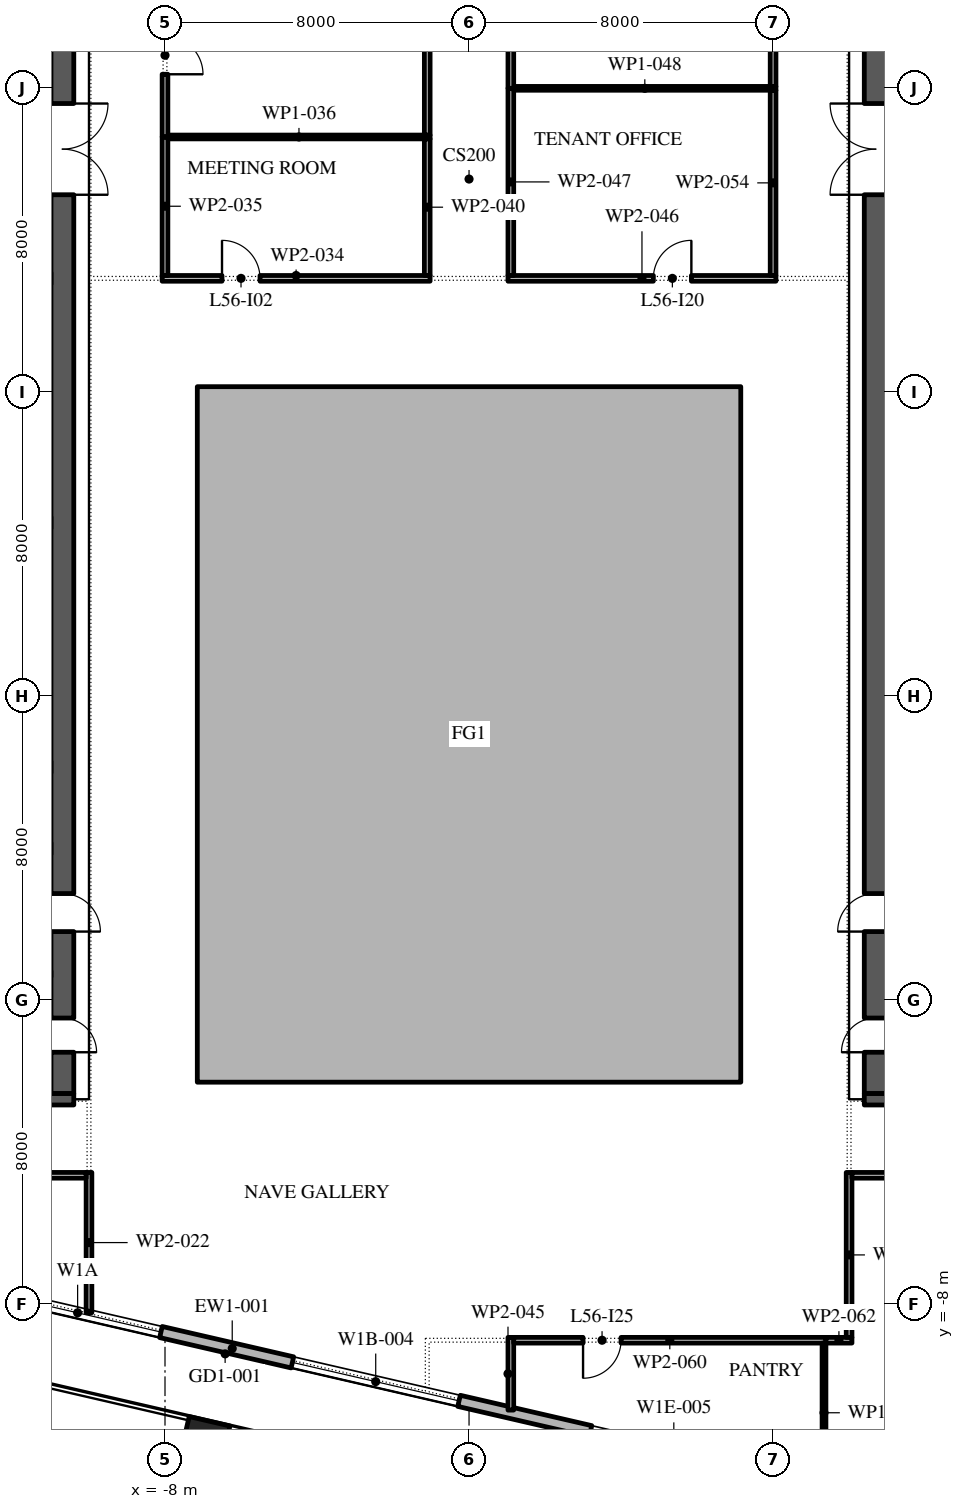
"""IFC4 building model, lengths in metres.
Left out: names, types, materials, properties, quantities, classifications, styles, units other than length and angle.
Written with IfcOpenShell. Run it as: python <this file> out.ifc"""

import sys

from ifc_helpers import new_model, si_unit, direction, frame, frame_2d, origin, origin_2d, place, context, subcontext, project, spatial, polyline, rectangle, outline, extrude, element, fill, save


model = new_model("IFC4")
c1 = context("Model", 3, precision=1e-05, world=origin(), true_north=direction((0.0, 1.0)))
c2 = subcontext(c1, "Body", "Model", "MODEL_VIEW")
j1 = project(units=[si_unit("LENGTHUNIT", "METRE"), si_unit("PLANEANGLEUNIT", "RADIAN")], contexts=[c1])
p1 = place(None, origin())
s1 = spatial("IfcSite", under=j1, at=p1, CompositionType="ELEMENT")
p2 = place(p1, origin())
s2 = spatial("IfcBuilding", under=s1, at=p2, CompositionType="ELEMENT")
p3 = place(p2, frame((0.0, 0.0, 259.8)))
s3 = spatial("IfcBuildingStorey", under=s2, at=p3, CompositionType="ELEMENT", Elevation=259.8)
p4 = place(p3, frame((-6.951, -11.608, 0.0), z_axis=(0.0, 0.0, 1.0), x_axis=(0.974370064785, -0.224951054344, 0.0)))
e1 = element("IfcColumn", 1, at=p4, inside=s3, PredefinedType="COLUMN", context=c2, shape_type="SweptSolid", body=[
    extrude(rectangle(XDim=1.1, YDim=1.1, at=origin_2d()), origin(), (0.0, 0.0, 1.0), 4.2),
])
p5 = place(p3, origin())
e2 = element("IfcWall", 2, at=p5, inside=s3, PredefinedType="STANDARD", context=c2, shape_type="SweptSolid", body=[
    extrude(outline(polyline([(-7.15, -2.15), (7.15, -2.15), (7.15, 16.15), (-7.15, 16.15), (-7.15, -2.15)]), holes=[polyline([(-7.0, -2.0), (-7.0, 16.0), (7.0, 16.0), (7.0, -2.0), (-7.0, -2.0)])]), origin(), (0.0, 0.0, 1.0), 4.0),
])
p6 = place(p3, frame((-29.616, -3.758, 0.0), z_axis=(0.0, 0.0, 1.0), x_axis=(0.974370532314, -0.224949029246, 0.0)))
e3 = element("IfcWall", 3, at=p6, inside=s3, PredefinedType="STANDARD", context=c2, shape_type="SweptSolid", body=[
    extrude(rectangle(XDim=48.0, YDim=0.3, at=frame_2d((24.0, 0.0))), origin(), (0.0, 0.0, 1.0), 4.0),
])
p7 = place(p6, frame((1.625, 0.0, 0.45)))
e4 = element("IfcOpeningElement", 4, at=p7, cuts=e3, PredefinedType="OPENING", context=c2, shape_type="SweptSolid", body=[
    extrude(rectangle(XDim=4.5, YDim=3.05, at=frame_2d((2.25, 1.525))), frame((0.0, 0.16, 0.0), z_axis=(0.0, -1.0, 0.0), x_axis=(1.0, 0.0, 0.0)), (0.0, 0.0, 1.0), 0.32),
])
p8 = place(p6, frame((10.575, 0.0, 0.0)))
e5 = element("IfcOpeningElement", 5, at=p8, cuts=e3, PredefinedType="OPENING", context=c2, shape_type="SweptSolid", body=[
    extrude(rectangle(XDim=2.4, YDim=3.5, at=frame_2d((1.2, 1.75))), frame((0.0, 0.16, 0.0), z_axis=(0.0, -1.0, 0.0), x_axis=(1.0, 0.0, 0.0)), (0.0, 0.0, 1.0), 0.32),
])
p9 = place(p6, frame((17.575, 0.0, 0.45)))
e6 = element("IfcOpeningElement", 6, at=p9, cuts=e3, PredefinedType="OPENING", context=c2, shape_type="SweptSolid", body=[
    extrude(rectangle(XDim=4.5, YDim=3.0, at=frame_2d((2.25, 1.5))), frame((0.0, 0.16, 0.0), z_axis=(0.0, -1.0, 0.0), x_axis=(1.0, 0.0, 0.0)), (0.0, 0.0, 1.0), 0.32),
])
p10 = place(p6, frame((25.625, 0.0, 0.45)))
e7 = element("IfcOpeningElement", 7, at=p10, cuts=e3, PredefinedType="OPENING", context=c2, shape_type="SweptSolid", body=[
    extrude(rectangle(XDim=4.5, YDim=2.95, at=frame_2d((2.25, 1.475))), frame((0.0, 0.16, 0.0), z_axis=(0.0, -1.0, 0.0), x_axis=(1.0, 0.0, 0.0)), (0.0, 0.0, 1.0), 0.32),
])
p11 = place(p6, frame((33.675, 0.0, 0.45)))
e8 = element("IfcOpeningElement", 8, at=p11, cuts=e3, PredefinedType="OPENING", context=c2, shape_type="SweptSolid", body=[
    extrude(rectangle(XDim=4.5, YDim=2.825, at=frame_2d((2.25, 1.413))), frame((0.0, 0.16, 0.0), z_axis=(0.0, -1.0, 0.0), x_axis=(1.0, 0.0, 0.0)), (0.0, 0.0, 1.0), 0.32),
])
p12 = place(p6, frame((42.775, 0.0, 0.0)))
e9 = element("IfcOpeningElement", 9, at=p12, cuts=e3, PredefinedType="OPENING", context=c2, shape_type="SweptSolid", body=[
    extrude(rectangle(XDim=2.4, YDim=3.5, at=frame_2d((1.2, 1.75))), frame((0.0, 0.16, 0.0), z_axis=(0.0, -1.0, 0.0), x_axis=(1.0, 0.0, 0.0)), (0.0, 0.0, 1.0), 0.32),
])
p13 = place(p3, frame((-10.7, -2.45, 0.0), z_axis=(0.0, 0.0, 1.0), x_axis=(0.0, 1.0, 0.0)))
e10 = element("IfcWall", 10, at=p13, inside=s3, PredefinedType="SHEAR", context=c2, shape_type="SweptSolid", body=[
    extrude(rectangle(XDim=27.9, YDim=0.6, at=frame_2d((13.95, 0.0))), origin(), (0.0, 0.0, 1.0), 4.0),
])
p14 = place(p13, frame((23.65, 0.0, 0.0)))
e11 = element("IfcOpeningElement", 11, at=p14, cuts=e10, PredefinedType="OPENING", context=c2, shape_type="SweptSolid", body=[
    extrude(rectangle(XDim=2.4, YDim=2.1, at=frame_2d((1.2, 1.05))), frame((0.0, 0.31, 0.0), z_axis=(0.0, -1.0, 0.0), x_axis=(1.0, 0.0, 0.0)), (0.0, 0.0, 1.0), 0.62),
])
p15 = place(p13, frame((1.087, 0.0, 0.0)))
e12 = element("IfcOpeningElement", 12, at=p15, cuts=e10, PredefinedType="OPENING", context=c2, shape_type="SweptSolid", body=[
    extrude(rectangle(XDim=0.9, YDim=2.1, at=frame_2d((0.45, 1.05))), frame((0.0, 0.31, 0.0), z_axis=(0.0, -1.0, 0.0), x_axis=(1.0, 0.0, 0.0)), (0.0, 0.0, 1.0), 0.62),
])
p16 = place(p13, frame((4.262, 0.0, 0.0)))
e13 = element("IfcOpeningElement", 13, at=p16, cuts=e10, PredefinedType="OPENING", context=c2, shape_type="SweptSolid", body=[
    extrude(rectangle(XDim=1.0, YDim=2.1, at=frame_2d((0.5, 1.05))), frame((0.0, 0.31, 0.0), z_axis=(0.0, -1.0, 0.0), x_axis=(1.0, 0.0, 0.0)), (0.0, 0.0, 1.0), 0.62),
])
p17 = place(p3, frame((-21.6, -2.6, 0.0), z_axis=(0.0, 0.0, 1.0), x_axis=(1.0, 0.0, 0.0)))
e14 = element("IfcWall", 14, at=p17, inside=s3, PredefinedType="SHEAR", context=c2, shape_type="SweptSolid", body=[
    extrude(rectangle(XDim=11.2, YDim=0.3, at=frame_2d((5.6, 0.0))), origin(), (0.0, 0.0, 1.0), 4.0),
])
p18 = place(p3, frame((10.7, -2.45, 0.0), z_axis=(0.0, 0.0, 1.0), x_axis=(0.0, 1.0, 0.0)))
e15 = element("IfcWall", 15, at=p18, inside=s3, PredefinedType="SHEAR", context=c2, shape_type="SweptSolid", body=[
    extrude(rectangle(XDim=27.9, YDim=0.6, at=frame_2d((13.95, 0.0))), origin(), (0.0, 0.0, 1.0), 4.0),
])
p19 = place(p18, frame((23.65, 0.0, 0.0)))
e16 = element("IfcOpeningElement", 16, at=p19, cuts=e15, PredefinedType="OPENING", context=c2, shape_type="SweptSolid", body=[
    extrude(rectangle(XDim=2.4, YDim=2.1, at=frame_2d((1.2, 1.05))), frame((0.0, 0.31, 0.0), z_axis=(0.0, -1.0, 0.0), x_axis=(1.0, 0.0, 0.0)), (0.0, 0.0, 1.0), 0.62),
])
p20 = place(p18, frame((1.087, 0.0, 0.0)))
e17 = element("IfcOpeningElement", 17, at=p20, cuts=e15, PredefinedType="OPENING", context=c2, shape_type="SweptSolid", body=[
    extrude(rectangle(XDim=0.9, YDim=2.1, at=frame_2d((0.45, 1.05))), frame((0.0, 0.31, 0.0), z_axis=(0.0, -1.0, 0.0), x_axis=(1.0, 0.0, 0.0)), (0.0, 0.0, 1.0), 0.62),
])
p21 = place(p18, frame((4.262, 0.0, 0.0)))
e18 = element("IfcOpeningElement", 18, at=p21, cuts=e15, PredefinedType="OPENING", context=c2, shape_type="SweptSolid", body=[
    extrude(rectangle(XDim=1.0, YDim=2.1, at=frame_2d((0.5, 1.05))), frame((0.0, 0.31, 0.0), z_axis=(0.0, -1.0, 0.0), x_axis=(1.0, 0.0, 0.0)), (0.0, 0.0, 1.0), 0.62),
])
p22 = place(p3, frame((10.4, -2.6, 0.0), z_axis=(0.0, 0.0, 1.0), x_axis=(1.0, 0.0, 0.0)))
e19 = element("IfcWall", 19, at=p22, inside=s3, PredefinedType="SHEAR", context=c2, shape_type="SweptSolid", body=[
    extrude(rectangle(XDim=11.2, YDim=0.3, at=frame_2d((5.6, 0.0))), origin(), (0.0, 0.0, 1.0), 4.0),
])
p23 = place(p3, frame((-10.0, -8.216, 0.0), z_axis=(0.0, 0.0, 1.0), x_axis=(0.0, 1.0, 0.0)))
e20 = element("IfcWall", 20, at=p23, inside=s3, PredefinedType="PARTITIONING", context=c2, shape_type="SweptSolid", body=[
    extrude(rectangle(XDim=3.691, YDim=0.15, at=frame_2d((1.846, 0.0))), origin(), (0.0, 0.0, 1.0), 4.0),
])
p24 = place(p3, frame((-10.075, -4.6, 0.0), z_axis=(0.0, 0.0, 1.0), x_axis=(-1.0, 0.0, 0.0)))
e21 = element("IfcWall", 21, at=p24, inside=s3, PredefinedType="PARTITIONING", context=c2, shape_type="SweptSolid", body=[
    extrude(rectangle(XDim=11.88, YDim=0.15, at=frame_2d((5.94, 0.0))), origin(), (0.0, 0.0, 1.0), 4.0),
])
p25 = place(p24, frame((3.055, 0.0, 0.0)))
e22 = element("IfcOpeningElement", 22, at=p25, cuts=e21, PredefinedType="OPENING", context=c2, shape_type="SweptSolid", body=[
    extrude(rectangle(XDim=1.0, YDim=2.1, at=frame_2d((0.5, 1.05))), frame((0.0, 0.085, 0.0), z_axis=(0.0, -1.0, 0.0), x_axis=(1.0, 0.0, 0.0)), (0.0, 0.0, 1.0), 0.17),
])
p26 = place(p3, frame((-8.075, 19.0, 0.0), z_axis=(0.0, 0.0, 1.0), x_axis=(1.0, 0.0, 0.0)))
e23 = element("IfcWall", 23, at=p26, inside=s3, PredefinedType="PARTITIONING", context=c2, shape_type="SweptSolid", body=[
    extrude(rectangle(XDim=7.05, YDim=0.15, at=frame_2d((3.525, 0.0))), origin(), (0.0, 0.0, 1.0), 4.0),
])
p27 = place(p26, frame((1.575, 0.0, 0.0)))
e24 = element("IfcOpeningElement", 24, at=p27, cuts=e23, PredefinedType="OPENING", context=c2, shape_type="SweptSolid", body=[
    extrude(rectangle(XDim=1.0, YDim=2.1, at=frame_2d((0.5, 1.05))), frame((0.0, 0.085, 0.0), z_axis=(0.0, -1.0, 0.0), x_axis=(1.0, 0.0, 0.0)), (0.0, 0.0, 1.0), 0.17),
])
p28 = place(p3, frame((-8.0, 22.72, 0.0), z_axis=(0.0, 0.0, 1.0), x_axis=(0.0, -1.0, 0.0)))
e25 = element("IfcWall", 25, at=p28, inside=s3, PredefinedType="PARTITIONING", context=c2, shape_type="SweptSolid", body=[
    extrude(rectangle(XDim=3.645, YDim=0.15, at=frame_2d((1.823, 0.0))), origin(), (0.0, 0.0, 1.0), 4.0),
])
p29 = place(p3, frame((-7.925, 22.72, 0.0), z_axis=(0.0, 0.0, 1.0), x_axis=(1.0, 0.0, 0.0)))
e26 = element("IfcWall", 26, at=p29, inside=s3, PredefinedType="PARTITIONING", context=c2, shape_type="SweptSolid", body=[
    extrude(rectangle(XDim=6.9, YDim=0.1, at=frame_2d((3.45, 0.0))), origin(), (0.0, 0.0, 1.0), 4.0),
])
p30 = place(p3, frame((-8.0, 28.19, 0.0), z_axis=(0.0, 0.0, 1.0), x_axis=(0.0, -1.0, 0.0)))
e27 = element("IfcWall", 27, at=p30, inside=s3, PredefinedType="PARTITIONING", context=c2, shape_type="SweptSolid", body=[
    extrude(rectangle(XDim=5.47, YDim=0.15, at=frame_2d((2.735, 0.0))), origin(), (0.0, 0.0, 1.0), 4.0),
])
p31 = place(p30, frame((2.82, 0.0, 0.0)))
e28 = element("IfcOpeningElement", 28, at=p31, cuts=e27, PredefinedType="OPENING", context=c2, shape_type="SweptSolid", body=[
    extrude(rectangle(XDim=1.0, YDim=2.1, at=frame_2d((0.5, 1.05))), frame((0.0, 0.085, 0.0), z_axis=(0.0, -1.0, 0.0), x_axis=(1.0, 0.0, 0.0)), (0.0, 0.0, 1.0), 0.17),
])
p32 = place(p3, frame((-1.1, 19.075, 0.0), z_axis=(0.0, 0.0, 1.0), x_axis=(0.0, 1.0, 0.0)))
e29 = element("IfcWall", 29, at=p32, inside=s3, PredefinedType="PARTITIONING", context=c2, shape_type="SweptSolid", body=[
    extrude(rectangle(XDim=3.595, YDim=0.15, at=frame_2d((1.797, 0.0))), origin(), (0.0, 0.0, 1.0), 4.0),
])
p33 = place(p3, frame((-1.1, 22.77, 0.0), z_axis=(0.0, 0.0, 1.0), x_axis=(0.0, 1.0, 0.0)))
e30 = element("IfcWall", 30, at=p33, inside=s3, PredefinedType="PARTITIONING", context=c2, shape_type="SweptSolid", body=[
    extrude(rectangle(XDim=5.32, YDim=0.15, at=frame_2d((2.66, 0.0))), origin(), (0.0, 0.0, 1.0), 4.0),
])
p34 = place(p3, frame((1.1, -8.865, 0.0), z_axis=(0.0, 0.0, 1.0), x_axis=(0.0, -1.0, 0.0)))
e31 = element("IfcWall", 31, at=p34, inside=s3, PredefinedType="PARTITIONING", context=c2, shape_type="SweptSolid", body=[
    extrude(rectangle(XDim=1.913, YDim=0.15, at=frame_2d((0.957, 0.0))), origin(), (0.0, 0.0, 1.0), 4.0),
])
p35 = place(p3, frame((1.025, 19.0, 0.0), z_axis=(0.0, 0.0, 1.0), x_axis=(1.0, 0.0, 0.0)))
e32 = element("IfcWall", 32, at=p35, inside=s3, PredefinedType="PARTITIONING", context=c2, shape_type="SweptSolid", body=[
    extrude(rectangle(XDim=7.05, YDim=0.15, at=frame_2d((3.525, 0.0))), origin(), (0.0, 0.0, 1.0), 4.0),
])
p36 = place(p35, frame((3.825, 0.0, 0.0)))
e33 = element("IfcOpeningElement", 33, at=p36, cuts=e32, PredefinedType="OPENING", context=c2, shape_type="SweptSolid", body=[
    extrude(rectangle(XDim=1.0, YDim=2.1, at=frame_2d((0.5, 1.05))), frame((0.0, 0.085, 0.0), z_axis=(0.0, -1.0, 0.0), x_axis=(1.0, 0.0, 0.0)), (0.0, 0.0, 1.0), 0.17),
])
p37 = place(p3, frame((1.1, 24.0, 0.0), z_axis=(0.0, 0.0, 1.0), x_axis=(0.0, -1.0, 0.0)))
e34 = element("IfcWall", 34, at=p37, inside=s3, PredefinedType="PARTITIONING", context=c2, shape_type="SweptSolid", body=[
    extrude(rectangle(XDim=4.925, YDim=0.15, at=frame_2d((2.462, 0.0))), origin(), (0.0, 0.0, 1.0), 4.0),
])
p38 = place(p3, frame((1.175, 24.0, 0.0), z_axis=(0.0, 0.0, 1.0), x_axis=(1.0, 0.0, 0.0)))
e35 = element("IfcWall", 35, at=p38, inside=s3, PredefinedType="PARTITIONING", context=c2, shape_type="SweptSolid", body=[
    extrude(rectangle(XDim=6.9, YDim=0.1, at=frame_2d((3.45, 0.0))), origin(), (0.0, 0.0, 1.0), 4.0),
])
p39 = place(p3, frame((1.1, 33.05, 0.0), z_axis=(0.0, 0.0, 1.0), x_axis=(0.0, -1.0, 0.0)))
e36 = element("IfcWall", 36, at=p39, inside=s3, PredefinedType="PARTITIONING", context=c2, shape_type="SweptSolid", body=[
    extrude(rectangle(XDim=9.05, YDim=0.15, at=frame_2d((4.525, 0.0))), origin(), (0.0, 0.0, 1.0), 4.0),
])
p40 = place(p39, frame((4.15, 0.0, 0.0)))
e37 = element("IfcOpeningElement", 37, at=p40, cuts=e36, PredefinedType="OPENING", context=c2, shape_type="SweptSolid", body=[
    extrude(rectangle(XDim=1.0, YDim=2.1, at=frame_2d((0.5, 1.05))), frame((0.0, 0.085, 0.0), z_axis=(0.0, -1.0, 0.0), x_axis=(1.0, 0.0, 0.0)), (0.0, 0.0, 1.0), 0.17),
])
p41 = place(p3, frame((8.0, 19.075, 0.0), z_axis=(0.0, 0.0, 1.0), x_axis=(0.0, 1.0, 0.0)))
e38 = element("IfcWall", 38, at=p41, inside=s3, PredefinedType="PARTITIONING", context=c2, shape_type="SweptSolid", body=[
    extrude(rectangle(XDim=4.875, YDim=0.15, at=frame_2d((2.438, 0.0))), origin(), (0.0, 0.0, 1.0), 4.0),
])
p42 = place(p3, frame((8.0, 24.05, 0.0), z_axis=(0.0, 0.0, 1.0), x_axis=(0.0, 1.0, 0.0)))
e39 = element("IfcWall", 39, at=p42, inside=s3, PredefinedType="PARTITIONING", context=c2, shape_type="SweptSolid", body=[
    extrude(rectangle(XDim=8.65, YDim=0.15, at=frame_2d((4.325, 0.0))), origin(), (0.0, 0.0, 1.0), 4.0),
])
p43 = place(p3, frame((9.39, -8.94, 0.0), z_axis=(0.0, 0.0, 1.0), x_axis=(-1.0, 0.0, 0.0)))
e40 = element("IfcWall", 40, at=p43, inside=s3, PredefinedType="PARTITIONING", context=c2, shape_type="SweptSolid", body=[
    extrude(rectangle(XDim=8.215, YDim=0.15, at=frame_2d((4.107, 0.0))), origin(), (0.0, 0.0, 1.0), 4.0),
])
p44 = place(p43, frame((5.39, 0.0, 0.0)))
e41 = element("IfcOpeningElement", 41, at=p44, cuts=e40, PredefinedType="OPENING", context=c2, shape_type="SweptSolid", body=[
    extrude(rectangle(XDim=1.0, YDim=2.1, at=frame_2d((0.5, 1.05))), frame((0.0, 0.085, 0.0), z_axis=(0.0, -1.0, 0.0), x_axis=(1.0, 0.0, 0.0)), (0.0, 0.0, 1.0), 0.17),
])
p45 = place(p3, frame((9.34, -9.015, 0.0), z_axis=(0.0, 0.0, 1.0), x_axis=(0.0, -1.0, 0.0)))
e42 = element("IfcWall", 42, at=p45, inside=s3, PredefinedType="PARTITIONING", context=c2, shape_type="SweptSolid", body=[
    extrude(rectangle(XDim=3.666, YDim=0.1, at=frame_2d((1.833, 0.0))), origin(), (0.0, 0.0, 1.0), 4.0),
])
p46 = place(p3, frame((10.075, -8.94, 0.0), z_axis=(0.0, 0.0, 1.0), x_axis=(-1.0, 0.0, 0.0)))
e43 = element("IfcWall", 43, at=p46, inside=s3, PredefinedType="PARTITIONING", context=c2, shape_type="SweptSolid", body=[
    extrude(rectangle(XDim=0.685, YDim=0.15, at=frame_2d((0.343, 0.0))), origin(), (0.0, 0.0, 1.0), 4.0),
])
p47 = place(p3, frame((10.0, -4.525, 0.0), z_axis=(0.0, 0.0, 1.0), x_axis=(0.0, -1.0, 0.0)))
e44 = element("IfcWall", 44, at=p47, inside=s3, PredefinedType="PARTITIONING", context=c2, shape_type="SweptSolid", body=[
    extrude(rectangle(XDim=4.34, YDim=0.15, at=frame_2d((2.17, 0.0))), origin(), (0.0, 0.0, 1.0), 4.0),
])
p48 = place(p3, frame((17.24, -4.6, 0.0), z_axis=(0.0, 0.0, 1.0), x_axis=(-1.0, 0.0, 0.0)))
e45 = element("IfcWall", 45, at=p48, inside=s3, PredefinedType="PARTITIONING", context=c2, shape_type="SweptSolid", body=[
    extrude(rectangle(XDim=7.165, YDim=0.15, at=frame_2d((3.583, 0.0))), origin(), (0.0, 0.0, 1.0), 4.0),
])
p49 = place(p48, frame((4.59, 0.0, 0.0)))
e46 = element("IfcOpeningElement", 46, at=p49, cuts=e45, PredefinedType="OPENING", context=c2, shape_type="SweptSolid", body=[
    extrude(rectangle(XDim=1.0, YDim=2.1, at=frame_2d((0.5, 1.05))), frame((0.0, 0.085, 0.0), z_axis=(0.0, -1.0, 0.0), x_axis=(1.0, 0.0, 0.0)), (0.0, 0.0, 1.0), 0.17),
])
p50 = place(p9, origin())
e47 = element("IfcWindow", 47, at=p50, inside=s3, PartitioningType="DOUBLE_PANEL_VERTICAL", PredefinedType="WINDOW", context=c2, shape_type="SweptSolid", body=[
    extrude(rectangle(XDim=4.5, YDim=3.0, at=frame_2d((2.25, 1.5))), frame((0.0, 0.03, 0.0), z_axis=(0.0, -1.0, 0.0), x_axis=(1.0, 0.0, 0.0)), (0.0, 0.0, 1.0), 0.06),
])
fill(e6, e47)
p51 = place(p10, origin())
e48 = element("IfcWindow", 48, at=p51, inside=s3, PartitioningType="DOUBLE_PANEL_VERTICAL", PredefinedType="WINDOW", context=c2, shape_type="SweptSolid", body=[
    extrude(rectangle(XDim=4.5, YDim=2.95, at=frame_2d((2.25, 1.475))), frame((0.0, 0.03, 0.0), z_axis=(0.0, -1.0, 0.0), x_axis=(1.0, 0.0, 0.0)), (0.0, 0.0, 1.0), 0.06),
])
fill(e7, e48)
p52 = place(p14, frame((2.4, 0.0, 0.0), z_axis=(0.0, 0.0, 1.0), x_axis=(-1.0, 0.0, 0.0)))
e49 = element("IfcDoor", 49, at=p52, inside=s3, OperationType="DOUBLE_DOOR_SINGLE_SWING", PredefinedType="DOOR", context=c2, shape_type="SweptSolid", body=[
    extrude(rectangle(XDim=2.4, YDim=2.1, at=frame_2d((1.2, 1.05))), frame((0.0, 0.025, 0.0), z_axis=(0.0, -1.0, 0.0), x_axis=(1.0, 0.0, 0.0)), (0.0, 0.0, 1.0), 0.05),
])
fill(e11, e49)
p53 = place(p19, origin())
e50 = element("IfcDoor", 50, at=p53, inside=s3, OperationType="DOUBLE_DOOR_SINGLE_SWING", PredefinedType="DOOR", context=c2, shape_type="SweptSolid", body=[
    extrude(rectangle(XDim=2.4, YDim=2.1, at=frame_2d((1.2, 1.05))), frame((0.0, 0.025, 0.0), z_axis=(0.0, -1.0, 0.0), x_axis=(1.0, 0.0, 0.0)), (0.0, 0.0, 1.0), 0.05),
])
fill(e16, e50)
p54 = place(p27, origin())
e51 = element("IfcDoor", 51, at=p54, inside=s3, OperationType="SINGLE_SWING_RIGHT", PredefinedType="DOOR", context=c2, shape_type="SweptSolid", body=[
    extrude(rectangle(XDim=1.0, YDim=2.1, at=frame_2d((0.5, 1.05))), frame((0.0, 0.025, 0.0), z_axis=(0.0, -1.0, 0.0), x_axis=(1.0, 0.0, 0.0)), (0.0, 0.0, 1.0), 0.05),
])
fill(e24, e51)
p55 = place(p31, origin())
e52 = element("IfcDoor", 52, at=p55, inside=s3, OperationType="SINGLE_SWING_LEFT", PredefinedType="DOOR", context=c2, shape_type="SweptSolid", body=[
    extrude(rectangle(XDim=1.0, YDim=2.1, at=frame_2d((0.5, 1.05))), frame((0.0, 0.025, 0.0), z_axis=(0.0, -1.0, 0.0), x_axis=(1.0, 0.0, 0.0)), (0.0, 0.0, 1.0), 0.05),
])
fill(e28, e52)
p56 = place(p36, origin())
e53 = element("IfcDoor", 53, at=p56, inside=s3, OperationType="SINGLE_SWING_LEFT", PredefinedType="DOOR", context=c2, shape_type="SweptSolid", body=[
    extrude(rectangle(XDim=1.0, YDim=2.1, at=frame_2d((0.5, 1.05))), frame((0.0, 0.025, 0.0), z_axis=(0.0, -1.0, 0.0), x_axis=(1.0, 0.0, 0.0)), (0.0, 0.0, 1.0), 0.05),
])
fill(e33, e53)
p57 = place(p44, origin())
e54 = element("IfcDoor", 54, at=p57, inside=s3, OperationType="SINGLE_SWING_LEFT", PredefinedType="DOOR", context=c2, shape_type="SweptSolid", body=[
    extrude(rectangle(XDim=1.0, YDim=2.1, at=frame_2d((0.5, 1.05))), frame((0.0, 0.025, 0.0), z_axis=(0.0, -1.0, 0.0), x_axis=(1.0, 0.0, 0.0)), (0.0, 0.0, 1.0), 0.05),
])
fill(e41, e54)
save(model, sys.argv[1])
